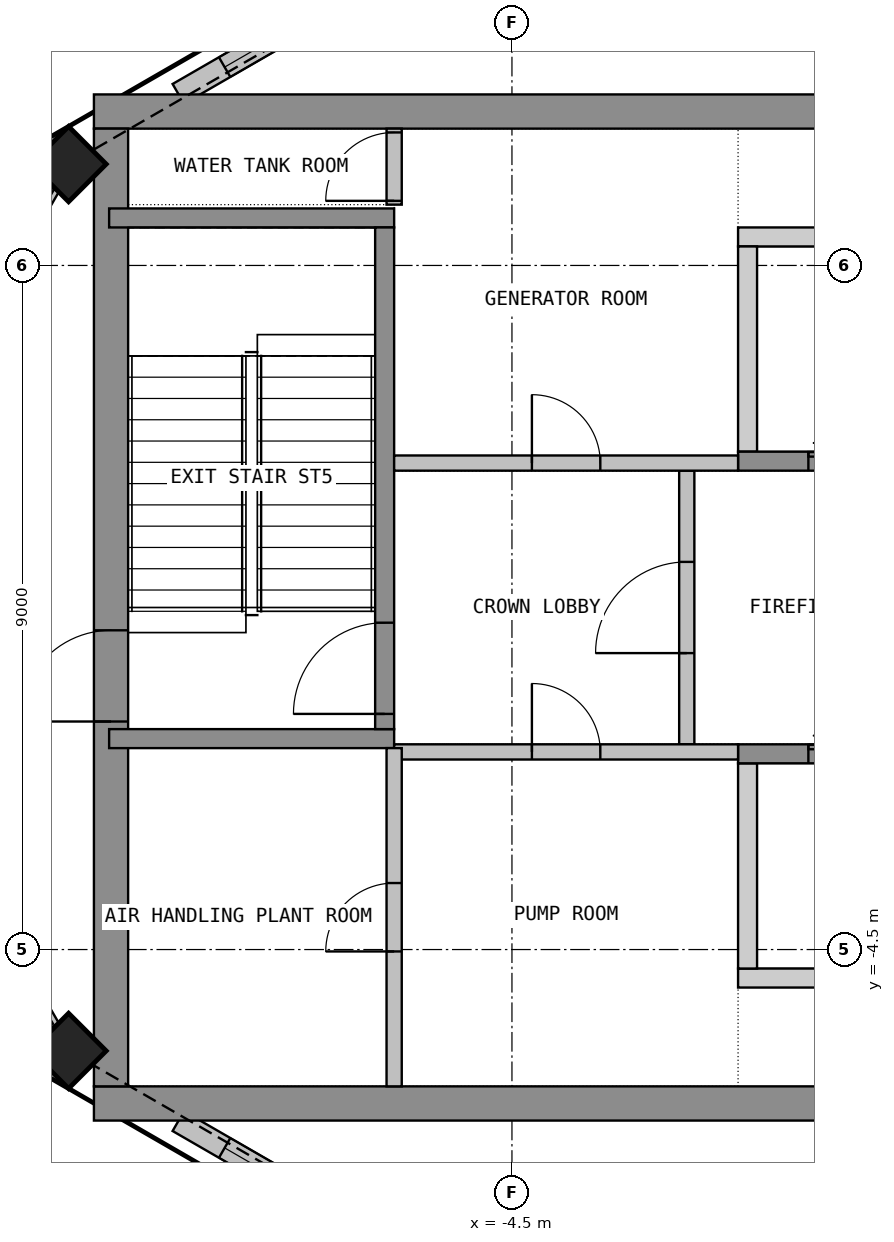
"""IFC4 building model, lengths in metres.
Left out: names, types, materials, properties, quantities, classifications, styles, units other than length and angle.
Written with IfcOpenShell. Run it as: python <this file> out.ifc"""

import sys

from ifc_helpers import new_model, si_unit, direction, frame, frame_2d, origin, origin_2d, place, context, subcontext, project, spatial, polyline, rectangle, outline, extrude, element, fill, save


model = new_model("IFC4")
c1 = context("Model", 3, precision=1e-05, world=origin(), true_north=direction((0.0, 1.0)))
c2 = subcontext(c1, "Body", "Model", "MODEL_VIEW")
j1 = project(units=[si_unit("LENGTHUNIT", "METRE"), si_unit("PLANEANGLEUNIT", "RADIAN")], contexts=[c1])
p1 = place(None, origin())
s1 = spatial("IfcSite", under=j1, at=p1, CompositionType="ELEMENT")
p2 = place(p1, origin())
s2 = spatial("IfcBuilding", under=s1, at=p2, CompositionType="ELEMENT")
p3 = place(p2, frame((0.0, 0.0, 336.9)))
s3 = spatial("IfcBuildingStorey", under=s2, at=p3, CompositionType="ELEMENT", Elevation=336.9)
for number, where, z_axis, x_axis in (
    (1, (-10.333, 5.833, 0.0), (0.0, 0.0, 1.0), (-0.707, -0.707, 0.0)),
    (2, (-10.333, -5.833, 0.0), (0.0, 0.0, 1.0), (0.707, -0.707, 0.0)),
):
    element("IfcColumn", number, at=place(p3, frame(where, z_axis=z_axis, x_axis=x_axis)), inside=s3, PredefinedType="COLUMN", context=c2, shape_type="SweptSolid", body=[
        extrude(rectangle(XDim=0.7, YDim=0.7, at=origin_2d()), origin(), (0.0, 0.0, 1.0), 3.9),
    ])
p4 = place(p3, frame((-7.005, 7.846, 0.0), z_axis=(0.0, 0.0, 1.0), x_axis=(-0.866060442015, -0.499939307093, 0.0)))
e3 = element("IfcWall", 3, at=p4, inside=s3, PredefinedType="SOLIDWALL", context=c2, shape_type="SweptSolid", body=[
    extrude(rectangle(XDim=2.177, YDim=0.3, at=frame_2d((1.088, 0.0))), origin(), (0.0, 0.0, 1.0), 3.0),
])
p5 = place(p4, frame((0.173, 0.0, 0.6)))
e4 = element("IfcOpeningElement", 4, at=p5, cuts=e3, PredefinedType="OPENING", context=c2, shape_type="SweptSolid", body=[
    extrude(rectangle(XDim=1.3, YDim=2.3, at=frame_2d((0.65, 1.15))), frame((0.0, 0.16, 0.0), z_axis=(0.0, -1.0, 0.0), x_axis=(1.0, 0.0, 0.0)), (0.0, 0.0, 1.0), 0.32),
])
p6 = place(p3, frame((-10.592, 5.542, 0.0), z_axis=(0.0, 0.0, 1.0), x_axis=(-0.499987607361, -0.86603255856, 0.0)))
e5 = element("IfcWall", 5, at=p6, inside=s3, PredefinedType="SOLIDWALL", context=c2, shape_type="SweptSolid", body=[
    extrude(rectangle(XDim=3.507, YDim=0.3, at=frame_2d((1.753, 0.0))), origin(), (0.0, 0.0, 1.0), 3.0),
])
p7 = place(p6, frame((0.553, 0.0, 0.6)))
e6 = element("IfcOpeningElement", 6, at=p7, cuts=e5, PredefinedType="OPENING", context=c2, shape_type="SweptSolid", body=[
    extrude(rectangle(XDim=2.4, YDim=2.3, at=frame_2d((1.2, 1.15))), frame((0.0, 0.16, 0.0), z_axis=(0.0, -1.0, 0.0), x_axis=(1.0, 0.0, 0.0)), (0.0, 0.0, 1.0), 0.32),
])
p8 = place(p3, frame((-12.346, -2.505, 0.0), z_axis=(0.0, 0.0, 1.0), x_axis=(0.499987607361, -0.86603255856, 0.0)))
e7 = element("IfcWall", 7, at=p8, inside=s3, PredefinedType="SOLIDWALL", context=c2, shape_type="SweptSolid", body=[
    extrude(rectangle(XDim=3.507, YDim=0.3, at=frame_2d((1.753, 0.0))), origin(), (0.0, 0.0, 1.0), 3.0),
])
p9 = place(p8, frame((0.553, 0.0, 0.6)))
e8 = element("IfcOpeningElement", 8, at=p9, cuts=e7, PredefinedType="OPENING", context=c2, shape_type="SweptSolid", body=[
    extrude(rectangle(XDim=2.4, YDim=2.3, at=frame_2d((1.2, 1.15))), frame((0.0, 0.16, 0.0), z_axis=(0.0, -1.0, 0.0), x_axis=(1.0, 0.0, 0.0)), (0.0, 0.0, 1.0), 0.32),
])
p10 = place(p3, frame((-8.89, -6.758, 0.0), z_axis=(0.0, 0.0, 1.0), x_axis=(0.866060442015, -0.499939307093, 0.0)))
e9 = element("IfcWall", 9, at=p10, inside=s3, PredefinedType="SOLIDWALL", context=c2, shape_type="SweptSolid", body=[
    extrude(rectangle(XDim=2.177, YDim=0.3, at=frame_2d((1.088, 0.0))), origin(), (0.0, 0.0, 1.0), 3.0),
])
p11 = place(p10, frame((0.704, 0.0, 0.6)))
e10 = element("IfcOpeningElement", 10, at=p11, cuts=e9, PredefinedType="OPENING", context=c2, shape_type="SweptSolid", body=[
    extrude(rectangle(XDim=1.3, YDim=2.3, at=frame_2d((0.65, 1.15))), frame((0.0, 0.16, 0.0), z_axis=(0.0, -1.0, 0.0), x_axis=(1.0, 0.0, 0.0)), (0.0, 0.0, 1.0), 0.32),
])
for number, where, z_axis, x_axis in (
    (11, (-10.0, 6.525, 0.0), (0.0, 0.0, 1.0), (1.0, 0.0, 0.0)),
    (12, (-10.0, -6.525, 0.0), (0.0, 0.0, 1.0), (1.0, 0.0, 0.0)),
):
    element("IfcWall", number, at=place(p3, frame(where, z_axis=z_axis, x_axis=x_axis)), inside=s3, PredefinedType="SHEAR", context=c2, shape_type="SweptSolid", body=[
        extrude(rectangle(XDim=20.0, YDim=0.45, at=frame_2d((10.0, 0.0))), origin(), (0.0, 0.0, 1.0), 3.9),
    ])
p12 = place(p3, frame((-9.775, -6.3, 0.0), z_axis=(0.0, 0.0, 1.0), x_axis=(0.0, 1.0, 0.0)))
e13 = element("IfcWall", 13, at=p12, inside=s3, PredefinedType="SHEAR", context=c2, shape_type="SweptSolid", body=[
    extrude(rectangle(XDim=12.6, YDim=0.45, at=frame_2d((6.3, 0.0))), origin(), (0.0, 0.0, 1.0), 3.9),
])
p13 = place(p12, frame((4.8, 0.0, 0.0)))
e14 = element("IfcOpeningElement", 14, at=p13, cuts=e13, PredefinedType="OPENING", context=c2, shape_type="SweptSolid", body=[
    extrude(rectangle(XDim=1.2, YDim=2.1, at=frame_2d((0.6, 1.05))), frame((0.0, 0.235, 0.0), z_axis=(0.0, -1.0, 0.0), x_axis=(1.0, 0.0, 0.0)), (0.0, 0.0, 1.0), 0.47),
])
p14 = place(p3, origin())
e15 = element("IfcWall", 15, at=p14, inside=s3, PredefinedType="SHEAR", context=c2, shape_type="SweptSolid", body=[
    extrude(outline(polyline([(-1.525, 4.75), (1.525, 4.75), (1.525, 5.0), (-1.525, 5.0), (-1.525, 4.75)])), origin(), (0.0, 0.0, 1.0), 3.9),
])
p15 = place(p3, origin())
e16 = element("IfcWall", 16, at=p15, inside=s3, PredefinedType="SHEAR", context=c2, shape_type="SweptSolid", body=[
    extrude(outline(polyline([(-1.525, 2.05), (-1.275, 2.05), (-1.275, 4.75), (-1.525, 4.75), (-1.525, 2.05)])), origin(), (0.0, 0.0, 1.0), 3.9),
])
p16 = place(p3, frame((-1.525, 1.925, 0.0), z_axis=(0.0, 0.0, 1.0), x_axis=(1.0, 0.0, 0.0)))
e17 = element("IfcWall", 17, at=p16, inside=s3, PredefinedType="SHEAR", context=c2, shape_type="SweptSolid", body=[
    extrude(rectangle(XDim=3.05, YDim=0.25, at=frame_2d((1.525, 0.0))), origin(), (0.0, 0.0, 1.0), 3.9),
])
p17 = place(p16, frame((0.925, 0.0, 0.0)))
e18 = element("IfcOpeningElement", 18, at=p17, cuts=e17, PredefinedType="OPENING", context=c2, shape_type="SweptSolid", body=[
    extrude(rectangle(XDim=1.2, YDim=2.1, at=frame_2d((0.6, 1.05))), frame((0.0, 0.135, 0.0), z_axis=(0.0, -1.0, 0.0), x_axis=(1.0, 0.0, 0.0)), (0.0, 0.0, 1.0), 0.27),
])
p18 = place(p3, origin())
e19 = element("IfcWall", 19, at=p18, inside=s3, PredefinedType="SHEAR", context=c2, shape_type="SweptSolid", body=[
    extrude(outline(polyline([(-1.525, -5.0), (1.525, -5.0), (1.525, -4.75), (-1.525, -4.75), (-1.525, -5.0)])), origin(), (0.0, 0.0, 1.0), 3.9),
])
p19 = place(p3, origin())
e20 = element("IfcWall", 20, at=p19, inside=s3, PredefinedType="SHEAR", context=c2, shape_type="SweptSolid", body=[
    extrude(outline(polyline([(-1.525, -4.75), (-1.275, -4.75), (-1.275, -2.05), (-1.525, -2.05), (-1.525, -4.75)])), origin(), (0.0, 0.0, 1.0), 3.9),
])
p20 = place(p3, frame((-1.525, -1.925, 0.0), z_axis=(0.0, 0.0, 1.0), x_axis=(1.0, 0.0, 0.0)))
e21 = element("IfcWall", 21, at=p20, inside=s3, PredefinedType="SHEAR", context=c2, shape_type="SweptSolid", body=[
    extrude(rectangle(XDim=3.05, YDim=0.25, at=frame_2d((1.525, 0.0))), origin(), (0.0, 0.0, 1.0), 3.9),
])
p21 = place(p20, frame((0.925, 0.0, 0.0)))
e22 = element("IfcOpeningElement", 22, at=p21, cuts=e21, PredefinedType="OPENING", context=c2, shape_type="SweptSolid", body=[
    extrude(rectangle(XDim=1.2, YDim=2.1, at=frame_2d((0.6, 1.05))), frame((0.0, 0.135, 0.0), z_axis=(0.0, -1.0, 0.0), x_axis=(1.0, 0.0, 0.0)), (0.0, 0.0, 1.0), 0.27),
])
p22 = place(p3, frame((-2.2, -1.8, 0.0), z_axis=(0.0, 0.0, 1.0), x_axis=(0.0, 1.0, 0.0)))
e23 = element("IfcWall", 23, at=p22, inside=s3, PredefinedType="PARTITIONING", context=c2, shape_type="SweptSolid", body=[
    extrude(rectangle(XDim=3.6, YDim=0.2, at=frame_2d((1.8, 0.0))), origin(), (0.0, 0.0, 1.0), 3.9),
])
p23 = place(p22, frame((1.2, 0.0, 0.0)))
e24 = element("IfcOpeningElement", 24, at=p23, cuts=e23, PredefinedType="OPENING", context=c2, shape_type="SweptSolid", body=[
    extrude(rectangle(XDim=1.2, YDim=2.1, at=frame_2d((0.6, 1.05))), frame((0.0, 0.11, 0.0), z_axis=(0.0, -1.0, 0.0), x_axis=(1.0, 0.0, 0.0)), (0.0, 0.0, 1.0), 0.22),
])
for number, where, z_axis, x_axis in (
    (25, (-9.8, -1.725, 0.0), (0.0, 0.0, 1.0), (1.0, 0.0, 0.0)),
    (26, (-9.8, 5.125, 0.0), (0.0, 0.0, 1.0), (1.0, 0.0, 0.0)),
):
    element("IfcWall", number, at=place(p3, frame(where, z_axis=z_axis, x_axis=x_axis)), inside=s3, PredefinedType="SHEAR", context=c2, shape_type="SweptSolid", body=[
        extrude(rectangle(XDim=3.75, YDim=0.25, at=frame_2d((1.875, 0.0))), origin(), (0.0, 0.0, 1.0), 3.9),
    ])
p24 = place(p3, frame((-6.175, -1.6, 0.0), z_axis=(0.0, 0.0, 1.0), x_axis=(0.0, 1.0, 0.0)))
e27 = element("IfcWall", 27, at=p24, inside=s3, PredefinedType="SHEAR", context=c2, shape_type="SweptSolid", body=[
    extrude(rectangle(XDim=6.6, YDim=0.25, at=frame_2d((3.3, 0.0))), origin(), (0.0, 0.0, 1.0), 3.9),
])
p25 = place(p24, frame((0.2, 0.0, 0.0)))
e28 = element("IfcOpeningElement", 28, at=p25, cuts=e27, PredefinedType="OPENING", context=c2, shape_type="SweptSolid", body=[
    extrude(rectangle(XDim=1.2, YDim=2.1, at=frame_2d((0.6, 1.05))), frame((0.0, 0.135, 0.0), z_axis=(0.0, -1.0, 0.0), x_axis=(1.0, 0.0, 0.0)), (0.0, 0.0, 1.0), 0.27),
])
p26 = place(p3, frame((-6.05, 1.9, 0.0), z_axis=(0.0, 0.0, 1.0), x_axis=(1.0, 0.0, 0.0)))
e29 = element("IfcWall", 29, at=p26, inside=s3, PredefinedType="PARTITIONING", context=c2, shape_type="SweptSolid", body=[
    extrude(rectangle(XDim=4.525, YDim=0.2, at=frame_2d((2.263, 0.0))), origin(), (0.0, 0.0, 1.0), 3.9),
])
p27 = place(p26, frame((1.812, 0.0, 0.0)))
e30 = element("IfcOpeningElement", 30, at=p27, cuts=e29, PredefinedType="OPENING", context=c2, shape_type="SweptSolid", body=[
    extrude(rectangle(XDim=0.9, YDim=2.1, at=frame_2d((0.45, 1.05))), frame((0.0, 0.11, 0.0), z_axis=(0.0, -1.0, 0.0), x_axis=(1.0, 0.0, 0.0)), (0.0, 0.0, 1.0), 0.22),
])
p28 = place(p3, frame((-6.05, -1.9, 0.0), z_axis=(0.0, 0.0, 1.0), x_axis=(1.0, 0.0, 0.0)))
e31 = element("IfcWall", 31, at=p28, inside=s3, PredefinedType="PARTITIONING", context=c2, shape_type="SweptSolid", body=[
    extrude(rectangle(XDim=4.525, YDim=0.2, at=frame_2d((2.263, 0.0))), origin(), (0.0, 0.0, 1.0), 3.9),
])
p29 = place(p28, frame((1.812, 0.0, 0.0)))
e32 = element("IfcOpeningElement", 32, at=p29, cuts=e31, PredefinedType="OPENING", context=c2, shape_type="SweptSolid", body=[
    extrude(rectangle(XDim=0.9, YDim=2.1, at=frame_2d((0.45, 1.05))), frame((0.0, 0.11, 0.0), z_axis=(0.0, -1.0, 0.0), x_axis=(1.0, 0.0, 0.0)), (0.0, 0.0, 1.0), 0.22),
])
p30 = place(p3, frame((-6.05, 5.3, 0.0), z_axis=(0.0, 0.0, 1.0), x_axis=(0.0, 1.0, 0.0)))
e33 = element("IfcWall", 33, at=p30, inside=s3, PredefinedType="PARTITIONING", context=c2, shape_type="SweptSolid", body=[
    extrude(rectangle(XDim=1.0, YDim=0.2, at=frame_2d((0.5, 0.0))), origin(), (0.0, 0.0, 1.0), 3.9),
])
p31 = place(p30, frame((0.05, 0.0, 0.0)))
e34 = element("IfcOpeningElement", 34, at=p31, cuts=e33, PredefinedType="OPENING", context=c2, shape_type="SweptSolid", body=[
    extrude(rectangle(XDim=0.9, YDim=2.1, at=frame_2d((0.45, 1.05))), frame((0.0, 0.11, 0.0), z_axis=(0.0, -1.0, 0.0), x_axis=(1.0, 0.0, 0.0)), (0.0, 0.0, 1.0), 0.22),
])
p32 = place(p3, frame((-6.05, -6.3, 0.0), z_axis=(0.0, 0.0, 1.0), x_axis=(0.0, 1.0, 0.0)))
e35 = element("IfcWall", 35, at=p32, inside=s3, PredefinedType="PARTITIONING", context=c2, shape_type="SweptSolid", body=[
    extrude(rectangle(XDim=4.45, YDim=0.2, at=frame_2d((2.225, 0.0))), origin(), (0.0, 0.0, 1.0), 3.9),
])
p33 = place(p32, frame((1.775, 0.0, 0.0)))
e36 = element("IfcOpeningElement", 36, at=p33, cuts=e35, PredefinedType="OPENING", context=c2, shape_type="SweptSolid", body=[
    extrude(rectangle(XDim=0.9, YDim=2.1, at=frame_2d((0.45, 1.05))), frame((0.0, 0.11, 0.0), z_axis=(0.0, -1.0, 0.0), x_axis=(1.0, 0.0, 0.0)), (0.0, 0.0, 1.0), 0.22),
])
p34 = place(p5, origin())
e37 = element("IfcWindow", 37, at=p34, inside=s3, PartitioningType="SINGLE_PANEL", PredefinedType="WINDOW", context=c2, shape_type="SweptSolid", body=[
    extrude(rectangle(XDim=1.3, YDim=2.3, at=frame_2d((0.65, 1.15))), frame((0.0, 0.03, 0.0), z_axis=(0.0, -1.0, 0.0), x_axis=(1.0, 0.0, 0.0)), (0.0, 0.0, 1.0), 0.06),
])
fill(e4, e37)
p35 = place(p11, origin())
e38 = element("IfcWindow", 38, at=p35, inside=s3, PartitioningType="SINGLE_PANEL", PredefinedType="WINDOW", context=c2, shape_type="SweptSolid", body=[
    extrude(rectangle(XDim=1.3, YDim=2.3, at=frame_2d((0.65, 1.15))), frame((0.0, 0.03, 0.0), z_axis=(0.0, -1.0, 0.0), x_axis=(1.0, 0.0, 0.0)), (0.0, 0.0, 1.0), 0.06),
])
fill(e10, e38)
p36 = place(p13, origin())
e39 = element("IfcDoor", 39, at=p36, inside=s3, OperationType="SINGLE_SWING_RIGHT", PredefinedType="DOOR", context=c2, shape_type="SweptSolid", body=[
    extrude(rectangle(XDim=1.2, YDim=2.1, at=frame_2d((0.6, 1.05))), frame((0.0, 0.025, 0.0), z_axis=(0.0, -1.0, 0.0), x_axis=(1.0, 0.0, 0.0)), (0.0, 0.0, 1.0), 0.05),
])
fill(e14, e39)
p37 = place(p17, origin())
e40 = element("IfcDoor", 40, at=p37, inside=s3, OperationType="DOUBLE_DOOR_SLIDING", PredefinedType="DOOR", context=c2, shape_type="SweptSolid", body=[
    extrude(rectangle(XDim=1.2, YDim=2.1, at=frame_2d((0.6, 1.05))), frame((0.0, 0.025, 0.0), z_axis=(0.0, -1.0, 0.0), x_axis=(1.0, 0.0, 0.0)), (0.0, 0.0, 1.0), 0.05),
])
fill(e18, e40)
p38 = place(p21, origin())
e41 = element("IfcDoor", 41, at=p38, inside=s3, OperationType="DOUBLE_DOOR_SLIDING", PredefinedType="DOOR", context=c2, shape_type="SweptSolid", body=[
    extrude(rectangle(XDim=1.2, YDim=2.1, at=frame_2d((0.6, 1.05))), frame((0.0, 0.025, 0.0), z_axis=(0.0, -1.0, 0.0), x_axis=(1.0, 0.0, 0.0)), (0.0, 0.0, 1.0), 0.05),
])
fill(e22, e41)
p39 = place(p23, origin())
e42 = element("IfcDoor", 42, at=p39, inside=s3, OperationType="SINGLE_SWING_LEFT", PredefinedType="DOOR", context=c2, shape_type="SweptSolid", body=[
    extrude(rectangle(XDim=1.2, YDim=2.1, at=frame_2d((0.6, 1.05))), frame((0.0, 0.025, 0.0), z_axis=(0.0, -1.0, 0.0), x_axis=(1.0, 0.0, 0.0)), (0.0, 0.0, 1.0), 0.05),
])
fill(e24, e42)
p40 = place(p25, origin())
e43 = element("IfcDoor", 43, at=p40, inside=s3, OperationType="SINGLE_SWING_LEFT", PredefinedType="DOOR", context=c2, shape_type="SweptSolid", body=[
    extrude(rectangle(XDim=1.2, YDim=2.1, at=frame_2d((0.6, 1.05))), frame((0.0, 0.025, 0.0), z_axis=(0.0, -1.0, 0.0), x_axis=(1.0, 0.0, 0.0)), (0.0, 0.0, 1.0), 0.05),
])
fill(e28, e43)
p41 = place(p27, origin())
e44 = element("IfcDoor", 44, at=p41, inside=s3, OperationType="SINGLE_SWING_LEFT", PredefinedType="DOOR", context=c2, shape_type="SweptSolid", body=[
    extrude(rectangle(XDim=0.9, YDim=2.1, at=frame_2d((0.45, 1.05))), frame((0.0, 0.025, 0.0), z_axis=(0.0, -1.0, 0.0), x_axis=(1.0, 0.0, 0.0)), (0.0, 0.0, 1.0), 0.05),
])
fill(e30, e44)
p42 = place(p29, origin())
e45 = element("IfcDoor", 45, at=p42, inside=s3, OperationType="SINGLE_SWING_LEFT", PredefinedType="DOOR", context=c2, shape_type="SweptSolid", body=[
    extrude(rectangle(XDim=0.9, YDim=2.1, at=frame_2d((0.45, 1.05))), frame((0.0, 0.025, 0.0), z_axis=(0.0, -1.0, 0.0), x_axis=(1.0, 0.0, 0.0)), (0.0, 0.0, 1.0), 0.05),
])
fill(e32, e45)
p43 = place(p31, origin())
e46 = element("IfcDoor", 46, at=p43, inside=s3, OperationType="SINGLE_SWING_LEFT", PredefinedType="DOOR", context=c2, shape_type="SweptSolid", body=[
    extrude(rectangle(XDim=0.9, YDim=2.1, at=frame_2d((0.45, 1.05))), frame((0.0, 0.025, 0.0), z_axis=(0.0, -1.0, 0.0), x_axis=(1.0, 0.0, 0.0)), (0.0, 0.0, 1.0), 0.05),
])
fill(e34, e46)
p44 = place(p33, origin())
e47 = element("IfcDoor", 47, at=p44, inside=s3, OperationType="SINGLE_SWING_LEFT", PredefinedType="DOOR", context=c2, shape_type="SweptSolid", body=[
    extrude(rectangle(XDim=0.9, YDim=2.1, at=frame_2d((0.45, 1.05))), frame((0.0, 0.025, 0.0), z_axis=(0.0, -1.0, 0.0), x_axis=(1.0, 0.0, 0.0)), (0.0, 0.0, 1.0), 0.05),
])
fill(e36, e47)
save(model, sys.argv[1])
